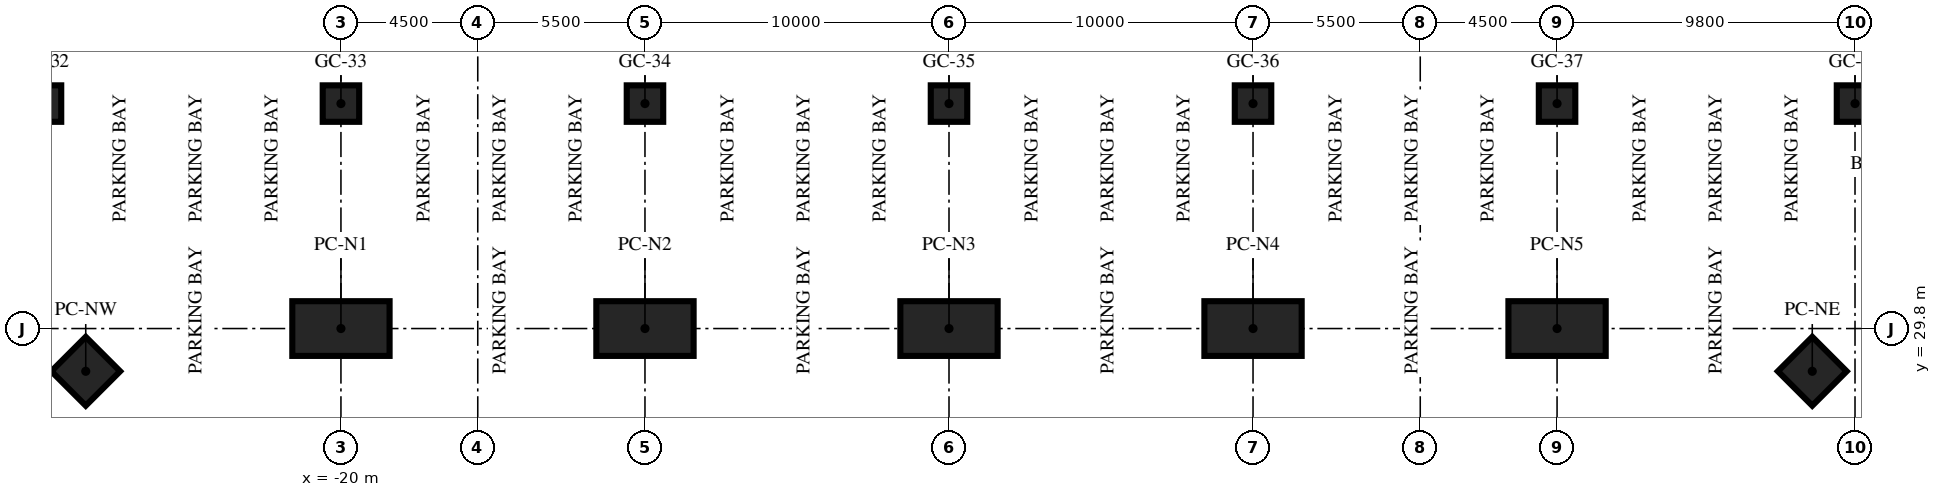
"""IFC4 building model, lengths in metres.
Left out: names, types, materials, properties, quantities, classifications, styles, units other than length and angle.
Written with IfcOpenShell. Run it as: python <this file> out.ifc"""

import sys

from ifc_helpers import new_model, si_unit, direction, frame, origin, origin_2d, place, context, subcontext, project, spatial, rectangle, hollow_rectangle, extrude, element, save


model = new_model("IFC4")
c1 = context("Model", 3, precision=1e-05, world=origin(), true_north=direction((0.0, 1.0)))
c2 = subcontext(c1, "Body", "Model", "MODEL_VIEW")
j1 = project(units=[si_unit("LENGTHUNIT", "METRE"), si_unit("PLANEANGLEUNIT", "RADIAN")], contexts=[c1])
p1 = place(None, origin())
s1 = spatial("IfcSite", under=j1, at=p1, CompositionType="ELEMENT")
p2 = place(p1, origin())
s2 = spatial("IfcBuilding", under=s1, at=p2, CompositionType="ELEMENT")
p3 = place(p2, frame((0.0, 0.0, -9.0)))
s3 = spatial("IfcBuildingStorey", under=s2, at=p3, CompositionType="ELEMENT", Elevation=-9.0)
for number, where, z_axis, x_axis in (
    (1, (-20.0, 29.8, 0.0), (0.0, 0.0, 1.0), (1.0, 0.0, 0.0)),
    (2, (-10.0, 29.8, 0.0), (0.0, 0.0, 1.0), (1.0, 0.0, 0.0)),
    (3, (0.0, 29.8, 0.0), (0.0, 0.0, 1.0), (1.0, 0.0, 0.0)),
    (4, (10.0, 29.8, 0.0), (0.0, 0.0, 1.0), (1.0, 0.0, 0.0)),
    (5, (20.0, 29.8, 0.0), (0.0, 0.0, 1.0), (1.0, 0.0, 0.0)),
):
    element("IfcColumn", number, at=place(p3, frame(where, z_axis=z_axis, x_axis=x_axis)), inside=s3, PredefinedType="COLUMN", context=c2, shape_type="SweptSolid", body=[
        extrude(hollow_rectangle(XDim=3.2, YDim=1.8, WallThickness=0.2, at=origin_2d()), origin(), (0.0, 0.0, 1.0), 3.6),
    ])
for number, where, z_axis, x_axis in (
    (6, (28.394, 28.394, 0.0), (0.0, 0.0, 1.0), (0.707, -0.707, 0.0)),
    (7, (-28.394, 28.394, 0.0), (0.0, 0.0, 1.0), (0.707, 0.707, 0.0)),
):
    element("IfcColumn", number, at=place(p3, frame(where, z_axis=z_axis, x_axis=x_axis)), inside=s3, PredefinedType="COLUMN", context=c2, shape_type="SweptSolid", body=[
        extrude(hollow_rectangle(XDim=1.6, YDim=1.6, WallThickness=0.1, at=origin_2d()), origin(), (0.0, 0.0, 1.0), 3.6),
    ])
for number, where, z_axis, x_axis in (
    (8, (-29.8, 37.2, 0.0), (0.0, 0.0, 1.0), (1.0, 0.0, 0.0)),
    (9, (-20.0, 37.2, 0.0), (0.0, 0.0, 1.0), (1.0, 0.0, 0.0)),
    (10, (-10.0, 37.2, 0.0), (0.0, 0.0, 1.0), (1.0, 0.0, 0.0)),
    (11, (0.0, 37.2, 0.0), (0.0, 0.0, 1.0), (1.0, 0.0, 0.0)),
    (12, (10.0, 37.2, 0.0), (0.0, 0.0, 1.0), (1.0, 0.0, 0.0)),
    (13, (20.0, 37.2, 0.0), (0.0, 0.0, 1.0), (1.0, 0.0, 0.0)),
    (14, (29.8, 37.2, 0.0), (0.0, 0.0, 1.0), (1.0, 0.0, 0.0)),
):
    element("IfcColumn", number, at=place(p3, frame(where, z_axis=z_axis, x_axis=x_axis)), inside=s3, PredefinedType="COLUMN", context=c2, shape_type="SweptSolid", body=[
        extrude(rectangle(XDim=1.2, YDim=1.2, at=origin_2d()), origin(), (0.0, 0.0, 1.0), 3.6),
    ])
save(model, sys.argv[1])
